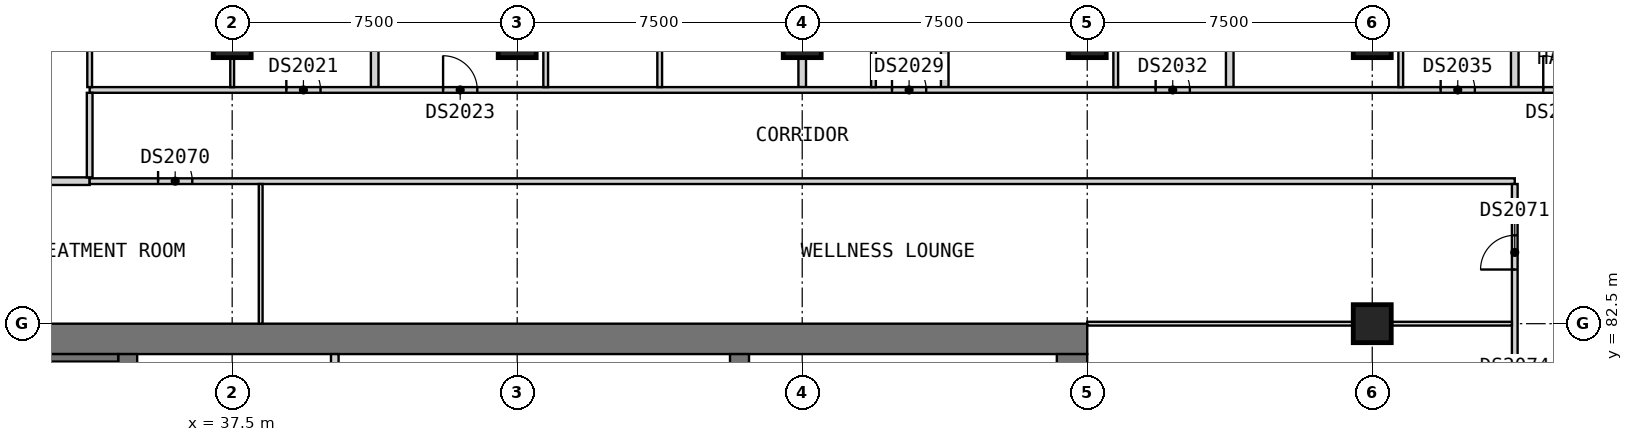
"""IFC4 building model, lengths in metres.
Left out: names, types, materials, properties, quantities, classifications, styles, units other than length and angle.
Written with IfcOpenShell. Run it as: python <this file> out.ifc"""

import sys

from ifc_helpers import new_model, si_unit, direction, frame, frame_2d, origin, origin_2d, place, context, subcontext, project, spatial, rectangle, extrude, element, fill, save


model = new_model("IFC4")
c1 = context("Model", 3, precision=1e-05, world=origin(), true_north=direction((0.0, 1.0)))
c2 = subcontext(c1, "Body", "Model", "MODEL_VIEW")
j1 = project(units=[si_unit("LENGTHUNIT", "METRE"), si_unit("PLANEANGLEUNIT", "RADIAN")], contexts=[c1])
p1 = place(None, origin())
s1 = spatial("IfcSite", under=j1, at=p1, CompositionType="ELEMENT")
p2 = place(p1, origin())
s2 = spatial("IfcBuilding", under=s1, at=p2, CompositionType="ELEMENT")
p3 = place(p2, frame((0.0, 0.0, 133.8)))
s3 = spatial("IfcBuildingStorey", under=s2, at=p3, CompositionType="ELEMENT", Elevation=133.8)
for number, where, z_axis, x_axis in (
    (1, (37.5, 90.0, 0.0), (0.0, 0.0, 1.0), (1.0, 0.0, 0.0)),
    (2, (45.0, 90.0, 0.0), (0.0, 0.0, 1.0), (1.0, 0.0, 0.0)),
    (3, (52.5, 90.0, 0.0), (0.0, 0.0, 1.0), (1.0, 0.0, 0.0)),
    (4, (60.0, 90.0, 0.0), (0.0, 0.0, 1.0), (1.0, 0.0, 0.0)),
    (5, (67.5, 82.5, 0.0), (0.0, 0.0, 1.0), (1.0, 0.0, 0.0)),
    (6, (67.5, 90.0, 0.0), (0.0, 0.0, 1.0), (1.0, 0.0, 0.0)),
):
    element("IfcColumn", number, at=place(p3, frame(where, z_axis=z_axis, x_axis=x_axis)), inside=s3, PredefinedType="COLUMN", context=c2, shape_type="SweptSolid", body=[
        extrude(rectangle(XDim=1.0, YDim=1.0, at=origin_2d()), origin(), (0.0, 0.0, 1.0), 3.6),
    ])
p4 = place(p3, frame((30.0, 82.1, 0.0), z_axis=(0.0, 0.0, 1.0), x_axis=(1.0, 0.0, 0.0)))
e7 = element("IfcWall", 7, at=p4, inside=s3, PredefinedType="SHEAR", context=c2, shape_type="SweptSolid", body=[
    extrude(rectangle(XDim=30.0, YDim=0.8, at=frame_2d((15.0, 0.0))), origin(), (0.0, 0.0, 1.0), 3.6),
])
p5 = place(p3, frame((59.6, 60.8, 0.0), z_axis=(0.0, 0.0, 1.0), x_axis=(0.0, 1.0, 0.0)))
e8 = element("IfcWall", 8, at=p5, inside=s3, PredefinedType="SHEAR", context=c2, shape_type="SweptSolid", body=[
    extrude(rectangle(XDim=20.9, YDim=0.8, at=frame_2d((10.45, 0.0))), origin(), (0.0, 0.0, 1.0), 3.6),
])
p6 = place(p5, frame((14.7, 0.0, 0.0)))
e9 = element("IfcOpeningElement", 9, at=p6, cuts=e8, PredefinedType="OPENING", context=c2, shape_type="SweptSolid", body=[
    extrude(rectangle(XDim=1.8, YDim=2.1, at=frame_2d((0.9, 1.05))), frame((0.0, 0.41, 0.0), z_axis=(0.0, -1.0, 0.0), x_axis=(1.0, 0.0, 0.0)), (0.0, 0.0, 1.0), 0.82),
])
for number, where, z_axis, x_axis in (
    (10, (34.75, 78.3, 0.0), (0.0, 0.0, 1.0), (0.0, 1.0, 0.0)),
    (11, (50.85, 78.3, 0.0), (0.0, 0.0, 1.0), (0.0, 1.0, 0.0)),
):
    element("IfcWall", number, at=place(p3, frame(where, z_axis=z_axis, x_axis=x_axis)), inside=s3, PredefinedType="SHEAR", context=c2, shape_type="SweptSolid", body=[
        extrude(rectangle(XDim=3.4, YDim=0.5, at=frame_2d((1.7, 0.0))), origin(), (0.0, 0.0, 1.0), 3.6),
    ])
p7 = place(p3, frame((40.2, 78.5, 0.0), z_axis=(0.0, 0.0, 1.0), x_axis=(0.0, 1.0, 0.0)))
e12 = element("IfcWall", 12, at=p7, inside=s3, PredefinedType="SOLIDWALL", context=c2, shape_type="SweptSolid", body=[
    extrude(rectangle(XDim=3.2, YDim=0.2, at=frame_2d((1.6, 0.0))), origin(), (0.0, 0.0, 1.0), 3.6),
])
p8 = place(p3, frame((31.0, 81.6, 0.0), z_axis=(0.0, 0.0, 1.0), x_axis=(1.0, 0.0, 0.0)))
e13 = element("IfcWall", 13, at=p8, inside=s3, PredefinedType="SOLIDWALL", context=c2, shape_type="SweptSolid", body=[
    extrude(rectangle(XDim=3.5, YDim=0.2, at=frame_2d((1.75, 0.0))), origin(), (0.0, 0.0, 1.0), 3.35),
])
p9 = place(p3, frame((30.81, 86.25, 0.0), z_axis=(0.0, 0.0, 1.0), x_axis=(1.0, 0.0, 0.0)))
e14 = element("IfcWall", 14, at=p9, inside=s3, PredefinedType="PARTITIONING", context=c2, shape_type="SweptSolid", body=[
    extrude(rectangle(XDim=2.94, YDim=0.2, at=frame_2d((1.47, 0.0))), origin(), (0.0, 0.0, 1.0), 3.35),
])
p10 = place(p3, frame((41.25, 88.725, 0.0), z_axis=(0.0, 0.0, 1.0), x_axis=(0.0, 1.0, 0.0)))
e15 = element("IfcWall", 15, at=p10, inside=s3, PredefinedType="PARTITIONING", context=c2, shape_type="SweptSolid", body=[
    extrude(rectangle(XDim=11.715, YDim=0.2, at=frame_2d((5.857, 0.0))), origin(), (0.0, 0.0, 1.0), 3.35),
])
p11 = place(p3, frame((52.5, 88.725, 0.0), z_axis=(0.0, 0.0, 1.0), x_axis=(0.0, 1.0, 0.0)))
e16 = element("IfcWall", 16, at=p11, inside=s3, PredefinedType="PARTITIONING", context=c2, shape_type="SweptSolid", body=[
    extrude(rectangle(XDim=12.525, YDim=0.2, at=frame_2d((6.262, 0.0))), origin(), (0.0, 0.0, 1.0), 3.35),
])
for number, where, z_axis, x_axis in (
    (17, (56.25, 88.725, 0.0), (0.0, 0.0, 1.0), (0.0, 1.0, 0.0)),
    (18, (63.75, 88.725, 0.0), (0.0, 0.0, 1.0), (0.0, 1.0, 0.0)),
    (19, (71.25, 88.725, 0.0), (0.0, 0.0, 1.0), (0.0, 1.0, 0.0)),
):
    element("IfcWall", number, at=place(p3, frame(where, z_axis=z_axis, x_axis=x_axis)), inside=s3, PredefinedType="PARTITIONING", context=c2, shape_type="SweptSolid", body=[
        extrude(rectangle(XDim=11.715, YDim=0.2, at=frame_2d((5.857, 0.0))), origin(), (0.0, 0.0, 1.0), 3.35),
    ])
p12 = place(p3, frame((33.75, 86.25, 0.0), z_axis=(0.0, 0.0, 1.0), x_axis=(1.0, 0.0, 0.0)))
e20 = element("IfcWall", 20, at=p12, inside=s3, PredefinedType="PARTITIONING", context=c2, shape_type="SweptSolid", body=[
    extrude(rectangle(XDim=37.5, YDim=0.15, at=frame_2d((18.75, 0.0))), origin(), (0.0, 0.0, 1.0), 3.35),
])
p13 = place(p12, frame((1.8, 0.0, 0.0)))
e21 = element("IfcOpeningElement", 21, at=p13, cuts=e20, PredefinedType="OPENING", context=c2, shape_type="SweptSolid", body=[
    extrude(rectangle(XDim=0.9, YDim=2.1, at=frame_2d((0.45, 1.05))), frame((0.0, 0.085, 0.0), z_axis=(0.0, -1.0, 0.0), x_axis=(1.0, 0.0, 0.0)), (0.0, 0.0, 1.0), 0.17),
])
p14 = place(p3, frame((33.75, 88.65, 0.0), z_axis=(0.0, 0.0, 1.0), x_axis=(1.0, 0.0, 0.0)))
e22 = element("IfcWall", 22, at=p14, inside=s3, PredefinedType="PARTITIONING", context=c2, shape_type="SweptSolid", body=[
    extrude(rectangle(XDim=39.9, YDim=0.15, at=frame_2d((19.95, 0.0))), origin(), (0.0, 0.0, 1.0), 3.35),
])
p15 = place(p14, frame((5.175, 0.0, 0.0)))
e23 = element("IfcOpeningElement", 23, at=p15, cuts=e22, PredefinedType="OPENING", context=c2, shape_type="SweptSolid", body=[
    extrude(rectangle(XDim=0.9, YDim=2.1, at=frame_2d((0.45, 1.05))), frame((0.0, 0.085, 0.0), z_axis=(0.0, -1.0, 0.0), x_axis=(1.0, 0.0, 0.0)), (0.0, 0.0, 1.0), 0.17),
])
p16 = place(p14, frame((9.3, 0.0, 0.0)))
e24 = element("IfcOpeningElement", 24, at=p16, cuts=e22, PredefinedType="OPENING", context=c2, shape_type="SweptSolid", body=[
    extrude(rectangle(XDim=0.9, YDim=2.1, at=frame_2d((0.45, 1.05))), frame((0.0, 0.085, 0.0), z_axis=(0.0, -1.0, 0.0), x_axis=(1.0, 0.0, 0.0)), (0.0, 0.0, 1.0), 0.17),
])
p17 = place(p14, frame((21.113, 0.0, 0.0)))
e25 = element("IfcOpeningElement", 25, at=p17, cuts=e22, PredefinedType="OPENING", context=c2, shape_type="SweptSolid", body=[
    extrude(rectangle(XDim=0.9, YDim=2.1, at=frame_2d((0.45, 1.05))), frame((0.0, 0.085, 0.0), z_axis=(0.0, -1.0, 0.0), x_axis=(1.0, 0.0, 0.0)), (0.0, 0.0, 1.0), 0.17),
])
p18 = place(p14, frame((28.05, 0.0, 0.0)))
e26 = element("IfcOpeningElement", 26, at=p18, cuts=e22, PredefinedType="OPENING", context=c2, shape_type="SweptSolid", body=[
    extrude(rectangle(XDim=0.9, YDim=2.1, at=frame_2d((0.45, 1.05))), frame((0.0, 0.085, 0.0), z_axis=(0.0, -1.0, 0.0), x_axis=(1.0, 0.0, 0.0)), (0.0, 0.0, 1.0), 0.17),
])
p19 = place(p14, frame((35.55, 0.0, 0.0)))
e27 = element("IfcOpeningElement", 27, at=p19, cuts=e22, PredefinedType="OPENING", context=c2, shape_type="SweptSolid", body=[
    extrude(rectangle(XDim=0.9, YDim=2.1, at=frame_2d((0.45, 1.05))), frame((0.0, 0.085, 0.0), z_axis=(0.0, -1.0, 0.0), x_axis=(1.0, 0.0, 0.0)), (0.0, 0.0, 1.0), 0.17),
])
p20 = place(p14, frame((38.25, 0.0, 0.0)))
e28 = element("IfcOpeningElement", 28, at=p20, cuts=e22, PredefinedType="OPENING", context=c2, shape_type="SweptSolid", body=[
    extrude(rectangle(XDim=0.9, YDim=2.1, at=frame_2d((0.45, 1.05))), frame((0.0, 0.085, 0.0), z_axis=(0.0, -1.0, 0.0), x_axis=(1.0, 0.0, 0.0)), (0.0, 0.0, 1.0), 0.17),
])
p21 = place(p3, frame((33.75, 86.35, 0.0), z_axis=(0.0, 0.0, 1.0), x_axis=(0.0, 1.0, 0.0)))
e29 = element("IfcWall", 29, at=p21, inside=s3, PredefinedType="PARTITIONING", context=c2, shape_type="SweptSolid", body=[
    extrude(rectangle(XDim=2.225, YDim=0.15, at=frame_2d((1.112, 0.0))), origin(), (0.0, 0.0, 1.0), 3.35),
])
p22 = place(p3, frame((71.25, 78.075, 0.0), z_axis=(0.0, 0.0, 1.0), x_axis=(0.0, 1.0, 0.0)))
e30 = element("IfcWall", 30, at=p22, inside=s3, PredefinedType="PARTITIONING", context=c2, shape_type="SweptSolid", body=[
    extrude(rectangle(XDim=8.1, YDim=0.15, at=frame_2d((4.05, 0.0))), origin(), (0.0, 0.0, 1.0), 3.35),
])
p23 = place(p22, frame((5.85, 0.0, 0.0)))
e31 = element("IfcOpeningElement", 31, at=p23, cuts=e30, PredefinedType="OPENING", context=c2, shape_type="SweptSolid", body=[
    extrude(rectangle(XDim=0.9, YDim=2.1, at=frame_2d((0.45, 1.05))), frame((0.0, 0.085, 0.0), z_axis=(0.0, -1.0, 0.0), x_axis=(1.0, 0.0, 0.0)), (0.0, 0.0, 1.0), 0.17),
])
p24 = place(p22, frame((1.725, 0.0, 0.0)))
e32 = element("IfcOpeningElement", 32, at=p24, cuts=e30, PredefinedType="OPENING", context=c2, shape_type="SweptSolid", body=[
    extrude(rectangle(XDim=0.9, YDim=2.1, at=frame_2d((0.45, 1.05))), frame((0.0, 0.085, 0.0), z_axis=(0.0, -1.0, 0.0), x_axis=(1.0, 0.0, 0.0)), (0.0, 0.0, 1.0), 0.17),
])
p25 = place(p3, frame((60.0, 82.5, 0.0), z_axis=(0.0, 0.0, 1.0), x_axis=(1.0, 0.0, 0.0)))
e33 = element("IfcWall", 33, at=p25, inside=s3, PredefinedType="PARTITIONING", context=c2, shape_type="SweptSolid", body=[
    extrude(rectangle(XDim=11.175, YDim=0.1, at=frame_2d((5.587, 0.0))), origin(), (0.0, 0.0, 1.0), 3.35),
])
p26 = place(p3, frame((37.5, 88.725, 0.0), z_axis=(0.0, 0.0, 1.0), x_axis=(0.0, 1.0, 0.0)))
e34 = element("IfcWall", 34, at=p26, inside=s3, PredefinedType="PARTITIONING", context=c2, shape_type="SweptSolid", body=[
    extrude(rectangle(XDim=4.725, YDim=0.1, at=frame_2d((2.362, 0.0))), origin(), (0.0, 0.0, 1.0), 3.35),
])
p27 = place(p26, frame((1.9, 0.0, 0.0)))
e35 = element("IfcOpeningElement", 35, at=p27, cuts=e34, PredefinedType="OPENING", context=c2, shape_type="SweptSolid", body=[
    extrude(rectangle(XDim=0.9, YDim=2.1, at=frame_2d((0.45, 1.05))), frame((0.0, 0.06, 0.0), z_axis=(0.0, -1.0, 0.0), x_axis=(1.0, 0.0, 0.0)), (0.0, 0.0, 1.0), 0.12),
])
p28 = place(p3, frame((38.25, 82.5, 0.0), z_axis=(0.0, 0.0, 1.0), x_axis=(0.0, 1.0, 0.0)))
e36 = element("IfcWall", 36, at=p28, inside=s3, PredefinedType="PARTITIONING", context=c2, shape_type="SweptSolid", body=[
    extrude(rectangle(XDim=3.675, YDim=0.1, at=frame_2d((1.837, 0.0))), origin(), (0.0, 0.0, 1.0), 3.35),
])
p29 = place(p3, frame((33.75, 88.725, 0.0), z_axis=(0.0, 0.0, 1.0), x_axis=(0.0, 1.0, 0.0)))
e37 = element("IfcWall", 37, at=p29, inside=s3, PredefinedType="PARTITIONING", context=c2, shape_type="SweptSolid", body=[
    extrude(rectangle(XDim=4.712, YDim=0.125, at=frame_2d((2.356, 0.0))), origin(), (0.0, 0.0, 1.0), 3.35),
])
p30 = place(p3, frame((45.75, 88.725, 0.0), z_axis=(0.0, 0.0, 1.0), x_axis=(0.0, 1.0, 0.0)))
e38 = element("IfcWall", 38, at=p30, inside=s3, PredefinedType="PARTITIONING", context=c2, shape_type="SweptSolid", body=[
    extrude(rectangle(XDim=4.712, YDim=0.125, at=frame_2d((2.356, 0.0))), origin(), (0.0, 0.0, 1.0), 3.35),
])
p31 = place(p30, frame((1.9, 0.0, 0.0)))
e39 = element("IfcOpeningElement", 39, at=p31, cuts=e38, PredefinedType="OPENING", context=c2, shape_type="SweptSolid", body=[
    extrude(rectangle(XDim=0.9, YDim=2.1, at=frame_2d((0.45, 1.05))), frame((0.0, 0.073, 0.0), z_axis=(0.0, -1.0, 0.0), x_axis=(1.0, 0.0, 0.0)), (0.0, 0.0, 1.0), 0.145),
])
for number, where, z_axis, x_axis in (
    (40, (48.75, 88.725, 0.0), (0.0, 0.0, 1.0), (0.0, 1.0, 0.0)),
    (41, (54.375, 88.725, 0.0), (0.0, 0.0, 1.0), (0.0, 1.0, 0.0)),
    (42, (60.75, 88.725, 0.0), (0.0, 0.0, 1.0), (0.0, 1.0, 0.0)),
    (43, (68.25, 88.725, 0.0), (0.0, 0.0, 1.0), (0.0, 1.0, 0.0)),
):
    element("IfcWall", number, at=place(p3, frame(where, z_axis=z_axis, x_axis=x_axis)), inside=s3, PredefinedType="PARTITIONING", context=c2, shape_type="SweptSolid", body=[
        extrude(rectangle(XDim=4.712, YDim=0.125, at=frame_2d((2.356, 0.0))), origin(), (0.0, 0.0, 1.0), 3.35),
    ])
p32 = place(p15, origin())
e44 = element("IfcDoor", 44, at=p32, inside=s3, OperationType="SINGLE_SWING_LEFT", PredefinedType="DOOR", context=c2, shape_type="SweptSolid", body=[
    extrude(rectangle(XDim=0.9, YDim=2.1, at=frame_2d((0.45, 1.05))), frame((0.0, 0.025, 0.0), z_axis=(0.0, -1.0, 0.0), x_axis=(1.0, 0.0, 0.0)), (0.0, 0.0, 1.0), 0.05),
])
fill(e23, e44)
p33 = place(p16, origin())
e45 = element("IfcDoor", 45, at=p33, inside=s3, OperationType="SINGLE_SWING_LEFT", PredefinedType="DOOR", context=c2, shape_type="SweptSolid", body=[
    extrude(rectangle(XDim=0.9, YDim=2.1, at=frame_2d((0.45, 1.05))), frame((0.0, 0.025, 0.0), z_axis=(0.0, -1.0, 0.0), x_axis=(1.0, 0.0, 0.0)), (0.0, 0.0, 1.0), 0.05),
])
fill(e24, e45)
p34 = place(p17, origin())
e46 = element("IfcDoor", 46, at=p34, inside=s3, OperationType="SINGLE_SWING_LEFT", PredefinedType="DOOR", context=c2, shape_type="SweptSolid", body=[
    extrude(rectangle(XDim=0.9, YDim=2.1, at=frame_2d((0.45, 1.05))), frame((0.0, 0.025, 0.0), z_axis=(0.0, -1.0, 0.0), x_axis=(1.0, 0.0, 0.0)), (0.0, 0.0, 1.0), 0.05),
])
fill(e25, e46)
p35 = place(p18, origin())
e47 = element("IfcDoor", 47, at=p35, inside=s3, OperationType="SINGLE_SWING_LEFT", PredefinedType="DOOR", context=c2, shape_type="SweptSolid", body=[
    extrude(rectangle(XDim=0.9, YDim=2.1, at=frame_2d((0.45, 1.05))), frame((0.0, 0.025, 0.0), z_axis=(0.0, -1.0, 0.0), x_axis=(1.0, 0.0, 0.0)), (0.0, 0.0, 1.0), 0.05),
])
fill(e26, e47)
p36 = place(p19, origin())
e48 = element("IfcDoor", 48, at=p36, inside=s3, OperationType="SINGLE_SWING_LEFT", PredefinedType="DOOR", context=c2, shape_type="SweptSolid", body=[
    extrude(rectangle(XDim=0.9, YDim=2.1, at=frame_2d((0.45, 1.05))), frame((0.0, 0.025, 0.0), z_axis=(0.0, -1.0, 0.0), x_axis=(1.0, 0.0, 0.0)), (0.0, 0.0, 1.0), 0.05),
])
fill(e27, e48)
p37 = place(p20, origin())
e49 = element("IfcDoor", 49, at=p37, inside=s3, OperationType="SINGLE_SWING_RIGHT", PredefinedType="DOOR", context=c2, shape_type="SweptSolid", body=[
    extrude(rectangle(XDim=0.9, YDim=2.1, at=frame_2d((0.45, 1.05))), frame((0.0, 0.025, 0.0), z_axis=(0.0, -1.0, 0.0), x_axis=(1.0, 0.0, 0.0)), (0.0, 0.0, 1.0), 0.05),
])
fill(e28, e49)
p38 = place(p13, origin())
e50 = element("IfcDoor", 50, at=p38, inside=s3, OperationType="SINGLE_SWING_RIGHT", PredefinedType="DOOR", context=c2, shape_type="SweptSolid", body=[
    extrude(rectangle(XDim=0.9, YDim=2.1, at=frame_2d((0.45, 1.05))), frame((0.0, 0.025, 0.0), z_axis=(0.0, -1.0, 0.0), x_axis=(1.0, 0.0, 0.0)), (0.0, 0.0, 1.0), 0.05),
])
fill(e21, e50)
p39 = place(p23, origin())
e51 = element("IfcDoor", 51, at=p39, inside=s3, OperationType="SINGLE_SWING_LEFT", PredefinedType="DOOR", context=c2, shape_type="SweptSolid", body=[
    extrude(rectangle(XDim=0.9, YDim=2.1, at=frame_2d((0.45, 1.05))), frame((0.0, 0.025, 0.0), z_axis=(0.0, -1.0, 0.0), x_axis=(1.0, 0.0, 0.0)), (0.0, 0.0, 1.0), 0.05),
])
fill(e31, e51)
save(model, sys.argv[1])
